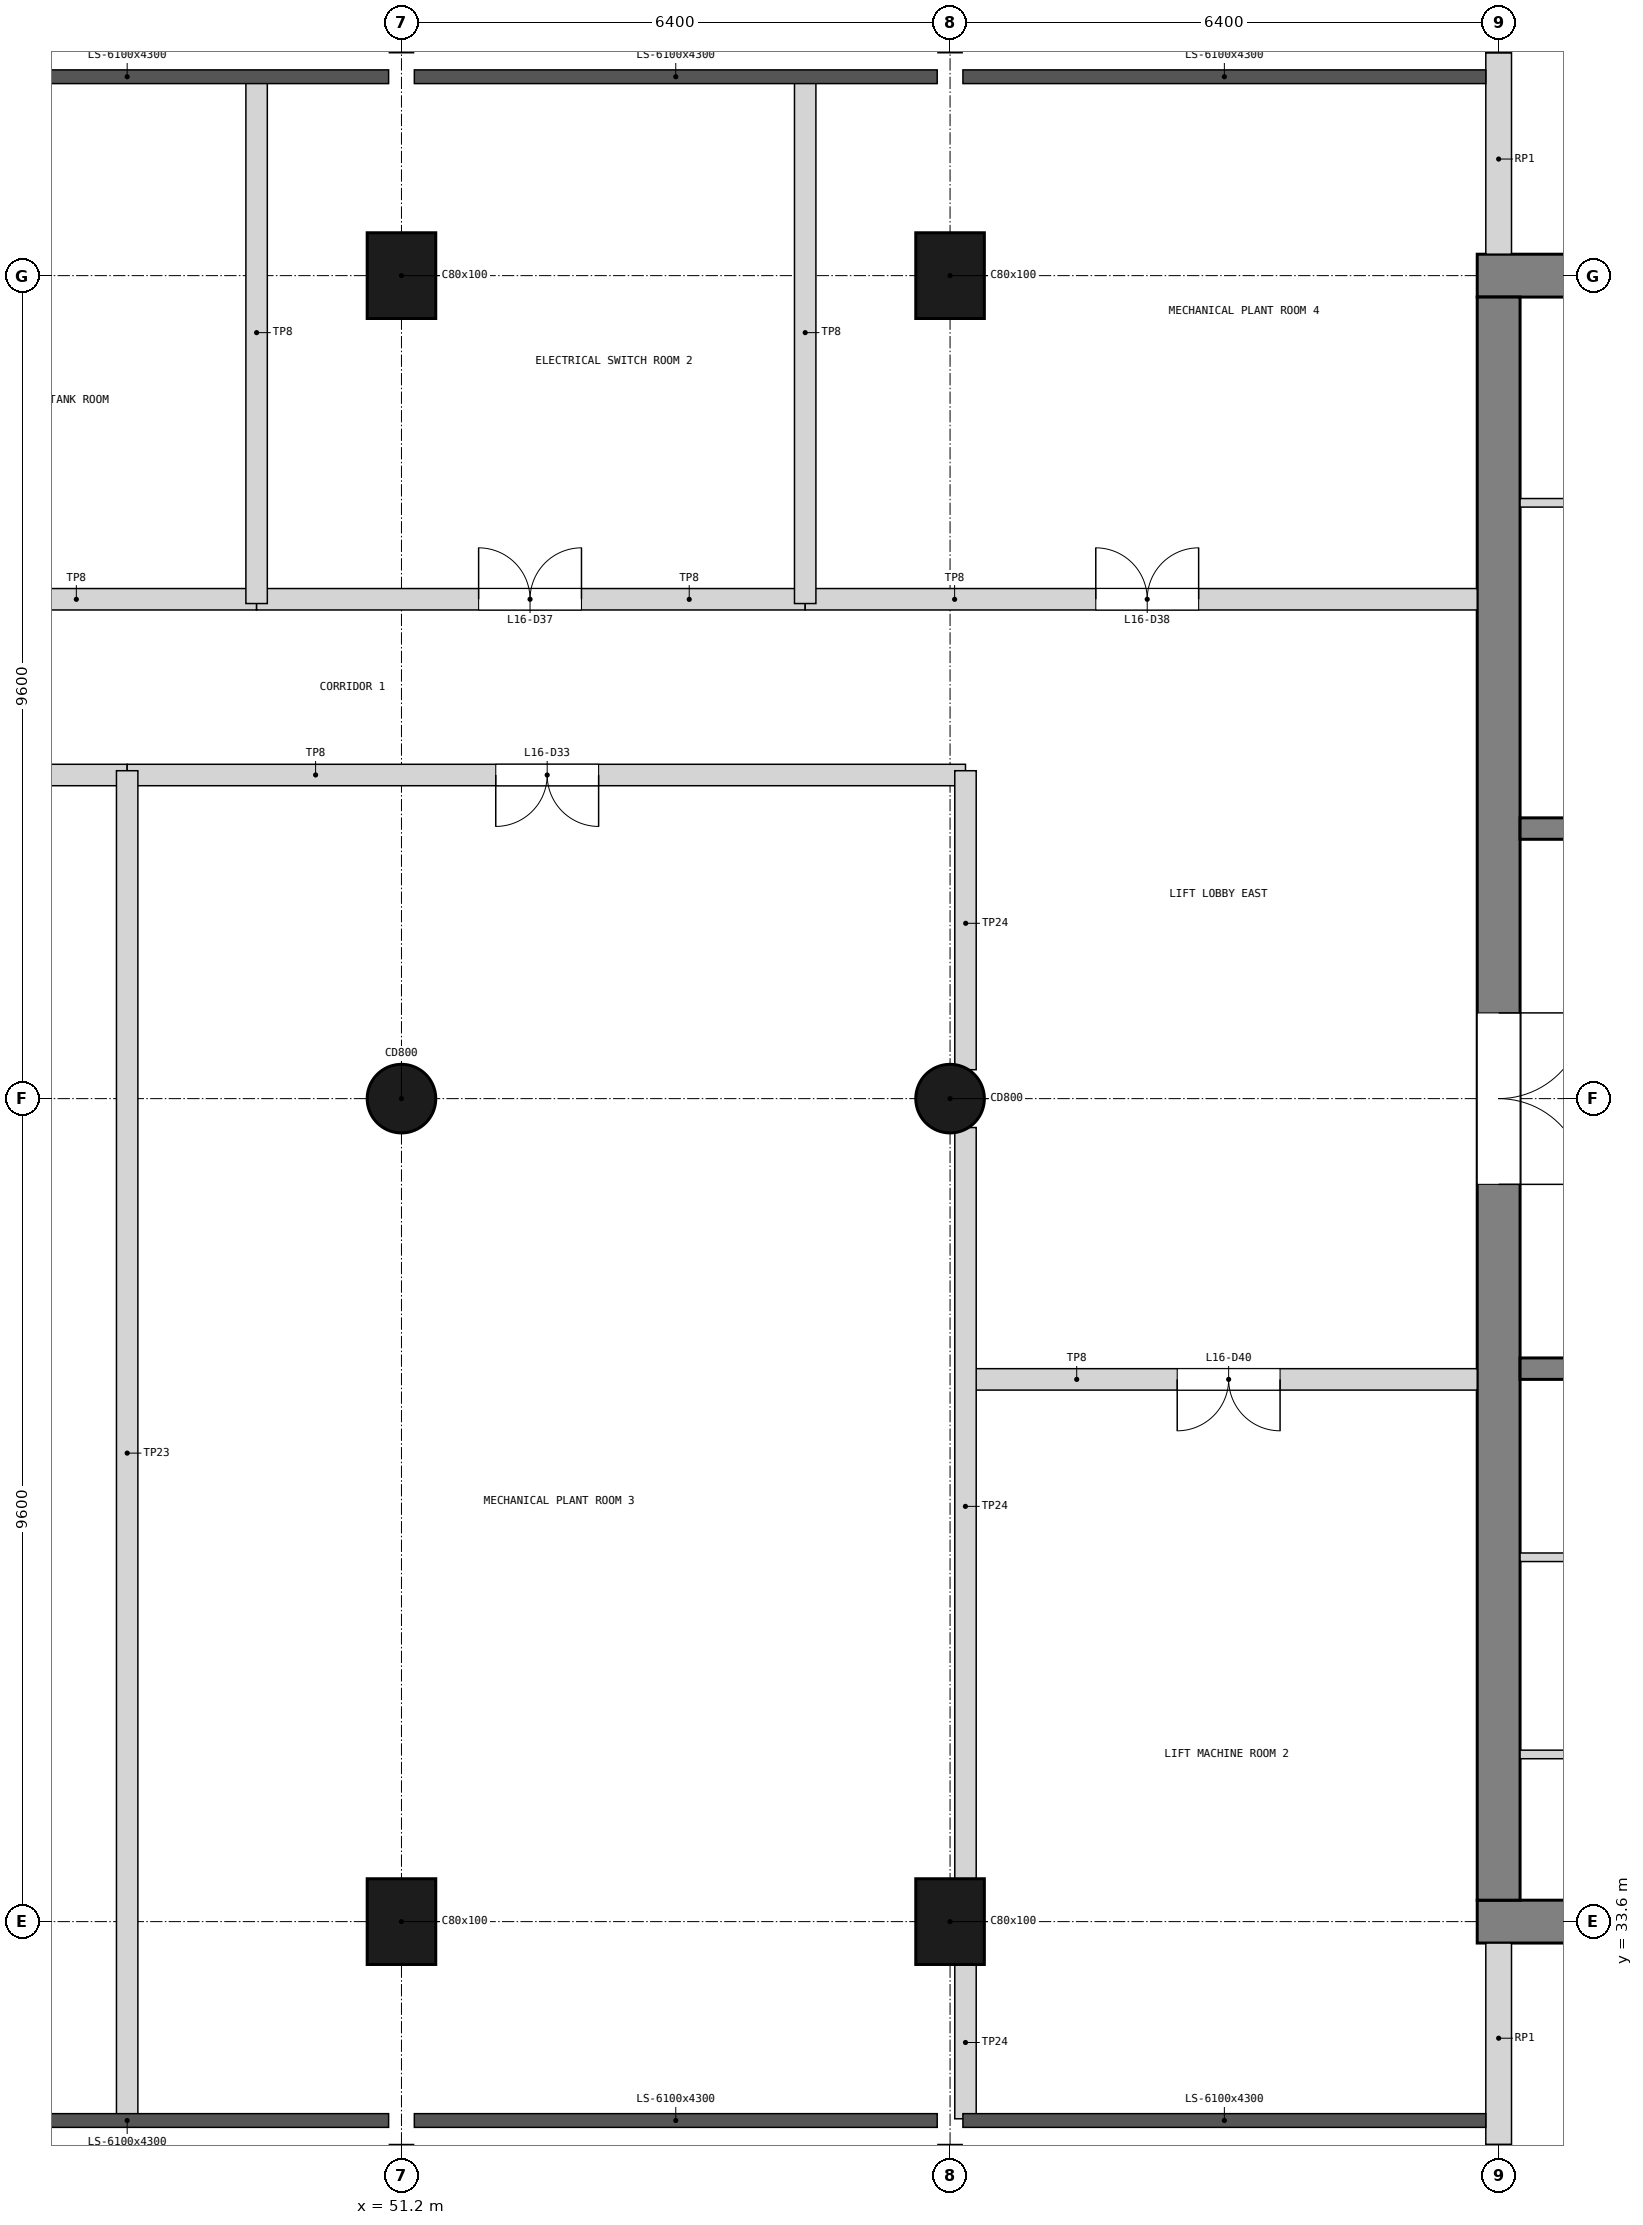
"""IFC4 building model, lengths in metres.
Left out: names, types, materials, properties, quantities, classifications, styles, units other than length and angle.
Written with IfcOpenShell. Run it as: python <this file> out.ifc"""

import sys

from ifc_helpers import new_model, si_unit, direction, frame, frame_2d, origin, origin_2d, place, context, subcontext, project, spatial, rectangle, circle, extrude, element, fill, save


model = new_model("IFC4")
c1 = context("Model", 3, precision=1e-05, world=origin(), true_north=direction((0.0, 1.0)))
c2 = subcontext(c1, "Body", "Model", "MODEL_VIEW")
j1 = project(units=[si_unit("LENGTHUNIT", "METRE"), si_unit("PLANEANGLEUNIT", "RADIAN")], contexts=[c1])
p1 = place(None, origin())
s1 = spatial("IfcSite", under=j1, at=p1, CompositionType="ELEMENT")
p2 = place(p1, origin())
s2 = spatial("IfcBuilding", under=s1, at=p2, CompositionType="ELEMENT")
p3 = place(p2, frame((0.0, 0.0, 64.2)))
s3 = spatial("IfcBuildingStorey", under=s2, at=p3, CompositionType="ELEMENT", Elevation=64.2)
p4 = place(p3, frame((63.75, 52.8, 0.0), z_axis=(0.0, 0.0, 1.0), x_axis=(1.0, 0.0, 0.0)))
e1 = element("IfcWall", 1, at=p4, inside=s3, PredefinedType="SHEAR", context=c2, shape_type="SweptSolid", body=[
    extrude(rectangle(XDim=13.3, YDim=0.5, at=frame_2d((6.65, 0.0))), origin(), (0.0, 0.0, 1.0), 5.1),
])
p5 = place(p4, frame((11.05, 0.0, 1.0)))
e2 = element("IfcOpeningElement", 2, at=p5, cuts=e1, PredefinedType="OPENING", context=c2, shape_type="SweptSolid", body=[
    extrude(rectangle(XDim=0.4, YDim=2.0, at=frame_2d((0.2, 1.0))), frame((0.0, 0.26, 0.0), z_axis=(0.0, -1.0, 0.0), x_axis=(1.0, 0.0, 0.0)), (0.0, 0.0, 1.0), 0.52),
])
p6 = place(p3, frame((63.75, 33.6, 0.0), z_axis=(0.0, 0.0, 1.0), x_axis=(1.0, 0.0, 0.0)))
e3 = element("IfcWall", 3, at=p6, inside=s3, PredefinedType="SHEAR", context=c2, shape_type="SweptSolid", body=[
    extrude(rectangle(XDim=13.3, YDim=0.5, at=frame_2d((6.65, 0.0))), origin(), (0.0, 0.0, 1.0), 5.1),
])
p7 = place(p6, frame((11.05, 0.0, 1.0)))
e4 = element("IfcOpeningElement", 4, at=p7, cuts=e3, PredefinedType="OPENING", context=c2, shape_type="SweptSolid", body=[
    extrude(rectangle(XDim=0.4, YDim=2.0, at=frame_2d((0.2, 1.0))), frame((0.0, 0.26, 0.0), z_axis=(0.0, -1.0, 0.0), x_axis=(1.0, 0.0, 0.0)), (0.0, 0.0, 1.0), 0.52),
])
p8 = place(p3, frame((64.0, 33.85, 0.0), z_axis=(0.0, 0.0, 1.0), x_axis=(0.0, 1.0, 0.0)))
e5 = element("IfcWall", 5, at=p8, inside=s3, PredefinedType="SHEAR", context=c2, shape_type="SweptSolid", body=[
    extrude(rectangle(XDim=18.7, YDim=0.5, at=frame_2d((9.35, 0.0))), origin(), (0.0, 0.0, 1.0), 5.1),
])
p9 = place(p8, frame((8.35, 0.0, 0.0)))
e6 = element("IfcOpeningElement", 6, at=p9, cuts=e5, PredefinedType="OPENING", context=c2, shape_type="SweptSolid", body=[
    extrude(rectangle(XDim=2.0, YDim=2.1, at=frame_2d((1.0, 1.05))), frame((0.0, 0.26, 0.0), z_axis=(0.0, -1.0, 0.0), x_axis=(1.0, 0.0, 0.0)), (0.0, 0.0, 1.0), 0.52),
])
p10 = place(p3, frame((51.2, 33.6, 0.0), z_axis=(0.0, 0.0, 1.0), x_axis=(1.0, 0.0, 0.0)))
e7 = element("IfcColumn", 7, at=p10, inside=s3, PredefinedType="COLUMN", context=c2, shape_type="SweptSolid", body=[
    extrude(rectangle(XDim=0.8, YDim=1.0, at=origin_2d()), origin(), (0.0, 0.0, 1.0), 5.4),
])
p11 = place(p3, frame((51.2, 43.2, 0.0), z_axis=(0.0, 0.0, 1.0), x_axis=(1.0, 0.0, 0.0)))
e8 = element("IfcColumn", 8, at=p11, inside=s3, PredefinedType="COLUMN", context=c2, shape_type="SweptSolid", body=[
    extrude(circle(Radius=0.4, at=origin_2d()), origin(), (0.0, 0.0, 1.0), 5.4),
])
for number, where, z_axis, x_axis in (
    (9, (51.2, 52.8, 0.0), (0.0, 0.0, 1.0), (1.0, 0.0, 0.0)),
    (10, (57.6, 33.6, 0.0), (0.0, 0.0, 1.0), (1.0, 0.0, 0.0)),
):
    element("IfcColumn", number, at=place(p3, frame(where, z_axis=z_axis, x_axis=x_axis)), inside=s3, PredefinedType="COLUMN", context=c2, shape_type="SweptSolid", body=[
        extrude(rectangle(XDim=0.8, YDim=1.0, at=origin_2d()), origin(), (0.0, 0.0, 1.0), 5.4),
    ])
p12 = place(p3, frame((57.6, 43.2, 0.0), z_axis=(0.0, 0.0, 1.0), x_axis=(1.0, 0.0, 0.0)))
e11 = element("IfcColumn", 11, at=p12, inside=s3, PredefinedType="COLUMN", context=c2, shape_type="SweptSolid", body=[
    extrude(circle(Radius=0.4, at=origin_2d()), origin(), (0.0, 0.0, 1.0), 5.4),
])
p13 = place(p3, frame((57.6, 52.8, 0.0), z_axis=(0.0, 0.0, 1.0), x_axis=(1.0, 0.0, 0.0)))
e12 = element("IfcColumn", 12, at=p13, inside=s3, PredefinedType="COLUMN", context=c2, shape_type="SweptSolid", body=[
    extrude(rectangle(XDim=0.8, YDim=1.0, at=origin_2d()), origin(), (0.0, 0.0, 1.0), 5.4),
])
p14 = place(p3, frame((64.0, 31.0, 0.0), z_axis=(0.0, 0.0, 1.0), x_axis=(0.0, 1.0, 0.0)))
e13 = element("IfcWall", 13, at=p14, inside=s3, PredefinedType="SOLIDWALL", context=c2, shape_type="SweptSolid", body=[
    extrude(rectangle(XDim=2.35, YDim=0.3, at=frame_2d((1.175, 0.0))), origin(), (0.0, 0.0, 1.0), 4.3),
])
p15 = place(p3, frame((64.0, 53.05, 0.0), z_axis=(0.0, 0.0, 1.0), x_axis=(0.0, 1.0, 0.0)))
e14 = element("IfcWall", 14, at=p15, inside=s3, PredefinedType="SOLIDWALL", context=c2, shape_type="SweptSolid", body=[
    extrude(rectangle(XDim=2.35, YDim=0.3, at=frame_2d((1.175, 0.0))), origin(), (0.0, 0.0, 1.0), 4.3),
])
for number, where, z_axis, x_axis in (
    (15, (69.725, 40.05, 0.0), (0.0, 0.0, 1.0), (-1.0, 0.0, 0.0)),
    (16, (69.725, 46.35, 0.0), (0.0, 0.0, 1.0), (-1.0, 0.0, 0.0)),
):
    element("IfcWall", number, at=place(p3, frame(where, z_axis=z_axis, x_axis=x_axis)), inside=s3, PredefinedType="SOLIDWALL", context=c2, shape_type="SweptSolid", body=[
        extrude(rectangle(XDim=5.475, YDim=0.25, at=frame_2d((2.738, 0.0))), origin(), (0.0, 0.0, 1.0), 5.1),
    ])
p16 = place(p3, frame((69.475, 35.55, 0.0), z_axis=(0.0, 0.0, 1.0), x_axis=(-1.0, 0.0, 0.0)))
e17 = element("IfcWall", 17, at=p16, inside=s3, PredefinedType="PARTITIONING", context=c2, shape_type="SweptSolid", body=[
    extrude(rectangle(XDim=5.225, YDim=0.1, at=frame_2d((2.613, 0.0))), origin(), (0.0, 0.0, 1.0), 5.1),
])
p17 = place(p3, frame((67.925, 37.85, 0.0), z_axis=(0.0, 0.0, 1.0), x_axis=(-1.0, 0.0, 0.0)))
e18 = element("IfcWall", 18, at=p17, inside=s3, PredefinedType="PARTITIONING", context=c2, shape_type="SweptSolid", body=[
    extrude(rectangle(XDim=3.675, YDim=0.1, at=frame_2d((1.837, 0.0))), origin(), (0.0, 0.0, 1.0), 5.1),
])
p18 = place(p3, frame((69.475, 50.15, 0.0), z_axis=(0.0, 0.0, 1.0), x_axis=(-1.0, 0.0, 0.0)))
e19 = element("IfcWall", 19, at=p18, inside=s3, PredefinedType="PARTITIONING", context=c2, shape_type="SweptSolid", body=[
    extrude(rectangle(XDim=5.225, YDim=0.1, at=frame_2d((2.613, 0.0))), origin(), (0.0, 0.0, 1.0), 5.1),
])
p19 = place(p3, frame((41.6, 46.975, 0.0), z_axis=(0.0, 0.0, 1.0), x_axis=(1.0, 0.0, 0.0)))
e20 = element("IfcWall", 20, at=p19, inside=s3, PredefinedType="PARTITIONING", context=c2, shape_type="SweptSolid", body=[
    extrude(rectangle(XDim=6.4, YDim=0.25, at=frame_2d((3.2, 0.0))), origin(), (0.0, 0.0, 1.0), 5.1),
])
p20 = place(p19, frame((2.6, 0.0, 0.0)))
e21 = element("IfcOpeningElement", 21, at=p20, cuts=e20, PredefinedType="OPENING", context=c2, shape_type="SweptSolid", body=[
    extrude(rectangle(XDim=1.2, YDim=2.1, at=frame_2d((0.6, 1.05))), frame((0.0, 0.135, 0.0), z_axis=(0.0, -1.0, 0.0), x_axis=(1.0, 0.0, 0.0)), (0.0, 0.0, 1.0), 0.27),
])
p21 = place(p3, frame((48.0, 46.975, 0.0), z_axis=(0.0, 0.0, 1.0), x_axis=(1.0, 0.0, 0.0)))
e22 = element("IfcWall", 22, at=p21, inside=s3, PredefinedType="PARTITIONING", context=c2, shape_type="SweptSolid", body=[
    extrude(rectangle(XDim=9.78, YDim=0.25, at=frame_2d((4.89, 0.0))), origin(), (0.0, 0.0, 1.0), 5.1),
])
p22 = place(p21, frame((4.3, 0.0, 0.0)))
e23 = element("IfcOpeningElement", 23, at=p22, cuts=e22, PredefinedType="OPENING", context=c2, shape_type="SweptSolid", body=[
    extrude(rectangle(XDim=1.2, YDim=2.1, at=frame_2d((0.6, 1.05))), frame((0.0, 0.135, 0.0), z_axis=(0.0, -1.0, 0.0), x_axis=(1.0, 0.0, 0.0)), (0.0, 0.0, 1.0), 0.27),
])
p23 = place(p3, frame((48.0, 31.3, 0.0), z_axis=(0.0, 0.0, 1.0), x_axis=(0.0, 1.0, 0.0)))
e24 = element("IfcWall", 24, at=p23, inside=s3, PredefinedType="PARTITIONING", context=c2, shape_type="SweptSolid", body=[
    extrude(rectangle(XDim=15.725, YDim=0.25, at=frame_2d((7.862, 0.0))), origin(), (0.0, 0.0, 1.0), 4.5),
])
p24 = place(p3, frame((40.09, 49.025, 0.0), z_axis=(0.0, 0.0, 1.0), x_axis=(1.0, 0.0, 0.0)))
e25 = element("IfcWall", 25, at=p24, inside=s3, PredefinedType="PARTITIONING", context=c2, shape_type="SweptSolid", body=[
    extrude(rectangle(XDim=9.42, YDim=0.25, at=frame_2d((4.71, 0.0))), origin(), (0.0, 0.0, 1.0), 5.1),
])
p25 = place(p24, frame((4.11, 0.0, 0.0)))
e26 = element("IfcOpeningElement", 26, at=p25, cuts=e25, PredefinedType="OPENING", context=c2, shape_type="SweptSolid", body=[
    extrude(rectangle(XDim=1.2, YDim=2.1, at=frame_2d((0.6, 1.05))), frame((0.0, 0.135, 0.0), z_axis=(0.0, -1.0, 0.0), x_axis=(1.0, 0.0, 0.0)), (0.0, 0.0, 1.0), 0.27),
])
p26 = place(p3, frame((49.51, 49.025, 0.0), z_axis=(0.0, 0.0, 1.0), x_axis=(1.0, 0.0, 0.0)))
e27 = element("IfcWall", 27, at=p26, inside=s3, PredefinedType="PARTITIONING", context=c2, shape_type="SweptSolid", body=[
    extrude(rectangle(XDim=6.4, YDim=0.25, at=frame_2d((3.2, 0.0))), origin(), (0.0, 0.0, 1.0), 5.1),
])
p27 = place(p26, frame((2.59, 0.0, 0.0)))
e28 = element("IfcOpeningElement", 28, at=p27, cuts=e27, PredefinedType="OPENING", context=c2, shape_type="SweptSolid", body=[
    extrude(rectangle(XDim=1.2, YDim=2.1, at=frame_2d((0.6, 1.05))), frame((0.0, 0.135, 0.0), z_axis=(0.0, -1.0, 0.0), x_axis=(1.0, 0.0, 0.0)), (0.0, 0.0, 1.0), 0.27),
])
p28 = place(p3, frame((55.91, 49.025, 0.0), z_axis=(0.0, 0.0, 1.0), x_axis=(1.0, 0.0, 0.0)))
e29 = element("IfcWall", 29, at=p28, inside=s3, PredefinedType="PARTITIONING", context=c2, shape_type="SweptSolid", body=[
    extrude(rectangle(XDim=7.84, YDim=0.25, at=frame_2d((3.92, 0.0))), origin(), (0.0, 0.0, 1.0), 5.1),
])
p29 = place(p28, frame((3.39, 0.0, 0.0)))
e30 = element("IfcOpeningElement", 30, at=p29, cuts=e29, PredefinedType="OPENING", context=c2, shape_type="SweptSolid", body=[
    extrude(rectangle(XDim=1.2, YDim=2.1, at=frame_2d((0.6, 1.05))), frame((0.0, 0.135, 0.0), z_axis=(0.0, -1.0, 0.0), x_axis=(1.0, 0.0, 0.0)), (0.0, 0.0, 1.0), 0.27),
])
for number, where, z_axis, x_axis in (
    (31, (49.51, 48.975, 0.0), (0.0, 0.0, 1.0), (0.0, 1.0, 0.0)),
    (32, (55.91, 48.975, 0.0), (0.0, 0.0, 1.0), (0.0, 1.0, 0.0)),
):
    element("IfcWall", number, at=place(p3, frame(where, z_axis=z_axis, x_axis=x_axis)), inside=s3, PredefinedType="PARTITIONING", context=c2, shape_type="SweptSolid", body=[
        extrude(rectangle(XDim=6.125, YDim=0.25, at=frame_2d((3.062, 0.0))), origin(), (0.0, 0.0, 1.0), 5.1),
    ])
p30 = place(p3, frame((57.78, 39.925, 0.0), z_axis=(0.0, 0.0, 1.0), x_axis=(1.0, 0.0, 0.0)))
e33 = element("IfcWall", 33, at=p30, inside=s3, PredefinedType="PARTITIONING", context=c2, shape_type="SweptSolid", body=[
    extrude(rectangle(XDim=5.97, YDim=0.25, at=frame_2d((2.985, 0.0))), origin(), (0.0, 0.0, 1.0), 5.1),
])
p31 = place(p30, frame((2.47, 0.0, 0.0)))
e34 = element("IfcOpeningElement", 34, at=p31, cuts=e33, PredefinedType="OPENING", context=c2, shape_type="SweptSolid", body=[
    extrude(rectangle(XDim=1.2, YDim=2.1, at=frame_2d((0.6, 1.05))), frame((0.0, 0.135, 0.0), z_axis=(0.0, -1.0, 0.0), x_axis=(1.0, 0.0, 0.0)), (0.0, 0.0, 1.0), 0.27),
])
p32 = place(p3, frame((57.78, 31.3, 0.0), z_axis=(0.0, 0.0, 1.0), x_axis=(0.0, 1.0, 0.0)))
e35 = element("IfcWall", 35, at=p32, inside=s3, PredefinedType="PARTITIONING", context=c2, shape_type="SweptSolid", body=[
    extrude(rectangle(XDim=1.82, YDim=0.25, at=frame_2d((0.91, 0.0))), origin(), (0.0, 0.0, 1.0), 4.2),
])
p33 = place(p3, frame((57.78, 34.08, 0.0), z_axis=(0.0, 0.0, 1.0), x_axis=(0.0, 1.0, 0.0)))
e36 = element("IfcWall", 36, at=p33, inside=s3, PredefinedType="PARTITIONING", context=c2, shape_type="SweptSolid", body=[
    extrude(rectangle(XDim=8.783, YDim=0.25, at=frame_2d((4.391, 0.0))), origin(), (0.0, 0.0, 1.0), 4.2),
])
p34 = place(p3, frame((57.78, 43.537, 0.0), z_axis=(0.0, 0.0, 1.0), x_axis=(0.0, 1.0, 0.0)))
e37 = element("IfcWall", 37, at=p34, inside=s3, PredefinedType="PARTITIONING", context=c2, shape_type="SweptSolid", body=[
    extrude(rectangle(XDim=3.488, YDim=0.25, at=frame_2d((1.744, 0.0))), origin(), (0.0, 0.0, 1.0), 4.2),
])
p35 = place(p9, frame((2.0, 0.0, 0.0), z_axis=(0.0, 0.0, 1.0), x_axis=(-1.0, 0.0, 0.0)))
e38 = element("IfcDoor", 38, at=p35, inside=s3, OperationType="DOUBLE_DOOR_SINGLE_SWING", PredefinedType="DOOR", context=c2, shape_type="SweptSolid", body=[
    extrude(rectangle(XDim=2.0, YDim=2.1, at=frame_2d((1.0, 1.05))), frame((0.0, 0.025, 0.0), z_axis=(0.0, -1.0, 0.0), x_axis=(1.0, 0.0, 0.0)), (0.0, 0.0, 1.0), 0.05),
])
fill(e6, e38)
p36 = place(p22, frame((1.2, 0.0, 0.0), z_axis=(0.0, 0.0, 1.0), x_axis=(-1.0, 0.0, 0.0)))
e39 = element("IfcDoor", 39, at=p36, inside=s3, OperationType="DOUBLE_DOOR_SINGLE_SWING", PredefinedType="DOOR", context=c2, shape_type="SweptSolid", body=[
    extrude(rectangle(XDim=1.2, YDim=2.1, at=frame_2d((0.6, 1.05))), frame((0.0, 0.025, 0.0), z_axis=(0.0, -1.0, 0.0), x_axis=(1.0, 0.0, 0.0)), (0.0, 0.0, 1.0), 0.05),
])
fill(e23, e39)
p37 = place(p27, origin())
e40 = element("IfcDoor", 40, at=p37, inside=s3, OperationType="DOUBLE_DOOR_SINGLE_SWING", PredefinedType="DOOR", context=c2, shape_type="SweptSolid", body=[
    extrude(rectangle(XDim=1.2, YDim=2.1, at=frame_2d((0.6, 1.05))), frame((0.0, 0.025, 0.0), z_axis=(0.0, -1.0, 0.0), x_axis=(1.0, 0.0, 0.0)), (0.0, 0.0, 1.0), 0.05),
])
fill(e28, e40)
p38 = place(p29, origin())
e41 = element("IfcDoor", 41, at=p38, inside=s3, OperationType="DOUBLE_DOOR_SINGLE_SWING", PredefinedType="DOOR", context=c2, shape_type="SweptSolid", body=[
    extrude(rectangle(XDim=1.2, YDim=2.1, at=frame_2d((0.6, 1.05))), frame((0.0, 0.025, 0.0), z_axis=(0.0, -1.0, 0.0), x_axis=(1.0, 0.0, 0.0)), (0.0, 0.0, 1.0), 0.05),
])
fill(e30, e41)
p39 = place(p31, frame((1.2, 0.0, 0.0), z_axis=(0.0, 0.0, 1.0), x_axis=(-1.0, 0.0, 0.0)))
e42 = element("IfcDoor", 42, at=p39, inside=s3, OperationType="DOUBLE_DOOR_SINGLE_SWING", PredefinedType="DOOR", context=c2, shape_type="SweptSolid", body=[
    extrude(rectangle(XDim=1.2, YDim=2.1, at=frame_2d((0.6, 1.05))), frame((0.0, 0.025, 0.0), z_axis=(0.0, -1.0, 0.0), x_axis=(1.0, 0.0, 0.0)), (0.0, 0.0, 1.0), 0.05),
])
fill(e34, e42)
save(model, sys.argv[1])
